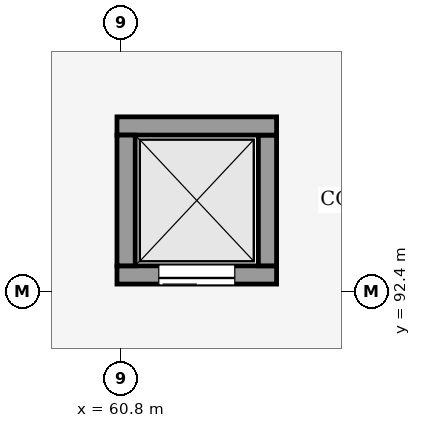
"""IFC4 building model, lengths in metres.
Left out: names, types, materials, properties, quantities, classifications, styles, units other than length and angle.
Written with IfcOpenShell. Run it as: python <this file> out.ifc"""

import sys

from ifc_helpers import new_model, si_unit, direction, frame, frame_2d, origin, place, context, subcontext, project, spatial, rectangle, extrude, element, fill, save


model = new_model("IFC4")
c1 = context("Model", 3, precision=1e-05, world=origin(), true_north=direction((0.0, 1.0)))
c2 = subcontext(c1, "Body", "Model", "MODEL_VIEW")
j1 = project(units=[si_unit("LENGTHUNIT", "METRE"), si_unit("PLANEANGLEUNIT", "RADIAN")], contexts=[c1])
p1 = place(None, origin())
s1 = spatial("IfcSite", under=j1, at=p1, CompositionType="ELEMENT")
p2 = place(p1, origin())
s2 = spatial("IfcBuilding", under=s1, at=p2, CompositionType="ELEMENT")
p3 = place(p2, frame((0.0, 0.0, 9.15)))
s3 = spatial("IfcBuildingStorey", under=s2, at=p3, CompositionType="ELEMENT", Elevation=9.15)
p4 = place(p3, frame((62.85, 92.62, 0.0), z_axis=(0.0, 0.0, 1.0), x_axis=(-1.0, 0.0, 0.0)))
e1 = element("IfcWall", 1, at=p4, inside=s3, PredefinedType="SHEAR", context=c2, shape_type="SweptSolid", body=[
    extrude(rectangle(XDim=2.1, YDim=0.24, at=frame_2d((1.05, 0.0))), origin(), (0.0, 0.0, 1.0), 4.05),
])
p5 = place(p4, frame((0.55, 0.0, 0.0)))
e2 = element("IfcOpeningElement", 2, at=p5, cuts=e1, PredefinedType="OPENING", context=c2, shape_type="SweptSolid", body=[
    extrude(rectangle(XDim=1.0, YDim=2.15, at=frame_2d((0.5, 1.075))), frame((0.0, 0.13, 0.0), z_axis=(0.0, -1.0, 0.0), x_axis=(1.0, 0.0, 0.0)), (0.0, 0.0, 1.0), 0.26),
])
p6 = place(p3, frame((62.73, 94.46, 0.0), z_axis=(0.0, 0.0, 1.0), x_axis=(0.0, -1.0, 0.0)))
e3 = element("IfcWall", 3, at=p6, inside=s3, PredefinedType="SHEAR", context=c2, shape_type="SweptSolid", body=[
    extrude(rectangle(XDim=1.72, YDim=0.24, at=frame_2d((0.86, 0.0))), origin(), (0.0, 0.0, 1.0), 4.05),
])
p7 = place(p3, frame((60.75, 94.58, 0.0), z_axis=(0.0, 0.0, 1.0), x_axis=(1.0, 0.0, 0.0)))
e4 = element("IfcWall", 4, at=p7, inside=s3, PredefinedType="SHEAR", context=c2, shape_type="SweptSolid", body=[
    extrude(rectangle(XDim=2.1, YDim=0.24, at=frame_2d((1.05, 0.0))), origin(), (0.0, 0.0, 1.0), 4.05),
])
p8 = place(p3, frame((60.87, 92.74, 0.0), z_axis=(0.0, 0.0, 1.0), x_axis=(0.0, 1.0, 0.0)))
e5 = element("IfcWall", 5, at=p8, inside=s3, PredefinedType="SHEAR", context=c2, shape_type="SweptSolid", body=[
    extrude(rectangle(XDim=1.72, YDim=0.24, at=frame_2d((0.86, 0.0))), origin(), (0.0, 0.0, 1.0), 4.05),
])
p9 = place(p5, origin())
e6 = element("IfcDoor", 6, at=p9, inside=s3, OperationType="SLIDING_TO_RIGHT", PredefinedType="DOOR", context=c2, shape_type="SweptSolid", body=[
    extrude(rectangle(XDim=1.0, YDim=2.15, at=frame_2d((0.5, 1.075))), frame((0.0, 0.025, 0.0), z_axis=(0.0, -1.0, 0.0), x_axis=(1.0, 0.0, 0.0)), (0.0, 0.0, 1.0), 0.05),
])
fill(e2, e6)
save(model, sys.argv[1])
